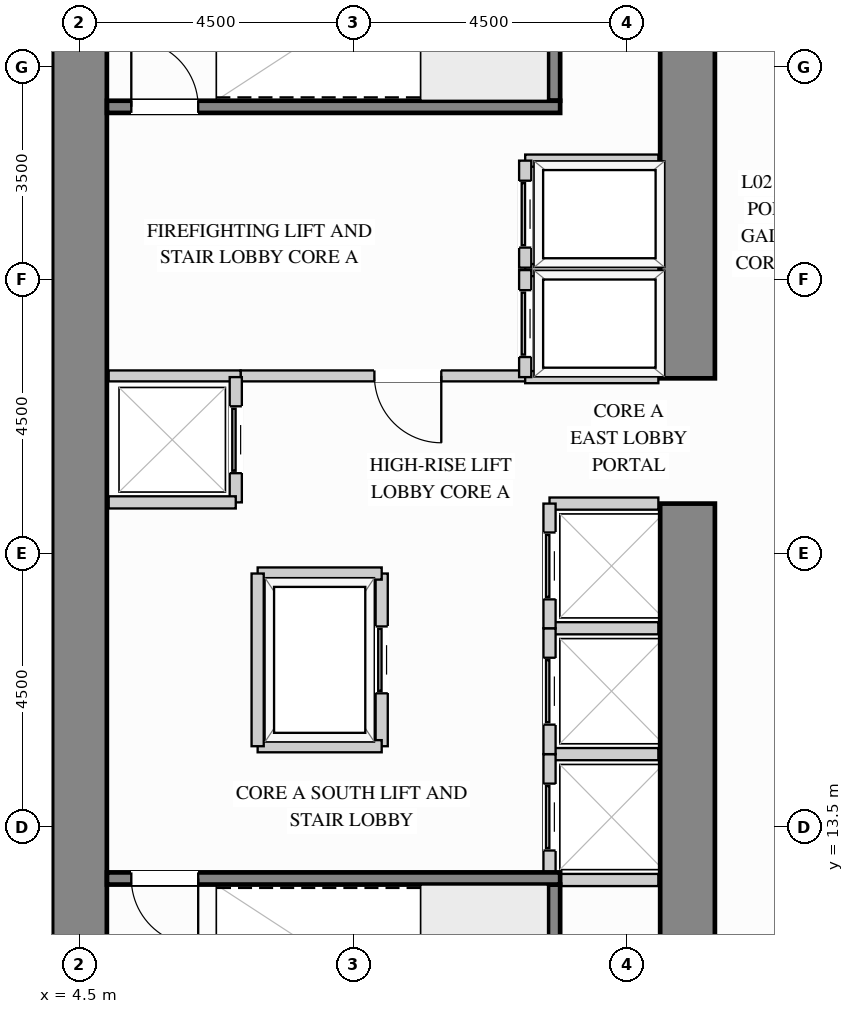
"""IFC4 building model, lengths in metres.
Left out: names, types, materials, properties, quantities, classifications, styles, units other than length and angle.
Written with IfcOpenShell. Run it as: python <this file> out.ifc"""

import sys

from ifc_helpers import new_model, si_unit, direction, frame, frame_2d, origin, place, context, subcontext, project, spatial, rectangle, extrude, source, transform, mapped, element, fill, save


model = new_model("IFC4")
c1 = context("Model", 3, precision=1e-05, world=origin(), true_north=direction((0.0, 1.0)))
c2 = subcontext(c1, "Body", "Model", "MODEL_VIEW")
j1 = project(units=[si_unit("LENGTHUNIT", "METRE"), si_unit("PLANEANGLEUNIT", "RADIAN")], contexts=[c1])
p1 = place(None, origin())
s1 = spatial("IfcSite", under=j1, at=p1, CompositionType="ELEMENT")
p2 = place(p1, origin())
s2 = spatial("IfcBuilding", under=s1, at=p2, CompositionType="ELEMENT")
p3 = place(p2, frame((0.0, 0.0, 9.0)))
s3 = spatial("IfcBuildingStorey", under=s2, at=p3, CompositionType="ELEMENT", Elevation=9.0)
m1 = source(origin(), c2, "Body", "SweptSolid", [
    extrude(rectangle(XDim=9.87, YDim=0.9, at=frame_2d((4.935, 0.0))), origin(), (0.0, 0.0, 1.0), 4.25),
])
p4 = place(p3, frame((14.5, 8.95, 0.0), z_axis=(0.0, 0.0, 1.0), x_axis=(0.0, 1.0, 0.0)))
e1 = element("IfcWall", 1, at=p4, inside=s3, PredefinedType="SHEAR", context=c2, shape_type="MappedRepresentation", body=[
    mapped(m1, transform((0.0, 0.0, 0.0), x_axis=(1.0, 0.0, 0.0), y_axis=(0.0, 1.0, 0.0), z_axis=(0.0, 0.0, 1.0))),
])
m2 = source(origin(), c2, "Body", "SweptSolid", [
    extrude(rectangle(XDim=8.17, YDim=0.9, at=frame_2d((4.085, 0.0))), origin(), (0.0, 0.0, 1.0), 4.25),
])
p5 = place(p3, frame((14.5, 20.88, 0.0), z_axis=(0.0, 0.0, 1.0), x_axis=(0.0, 1.0, 0.0)))
e2 = element("IfcWall", 2, at=p5, inside=s3, PredefinedType="SHEAR", context=c2, shape_type="MappedRepresentation", body=[
    mapped(m2, transform((0.0, 0.0, 0.0), x_axis=(1.0, 0.0, 0.0), y_axis=(0.0, 1.0, 0.0), z_axis=(0.0, 0.0, 1.0))),
])
m3 = source(origin(), c2, "Body", "SweptSolid", [
    extrude(rectangle(XDim=20.1, YDim=0.9, at=frame_2d((10.05, 0.0))), origin(), (0.0, 0.0, 1.0), 4.25),
])
p6 = place(p3, frame((4.5, 8.95, 0.0), z_axis=(0.0, 0.0, 1.0), x_axis=(0.0, 1.0, 0.0)))
e3 = element("IfcWall", 3, at=p6, inside=s3, PredefinedType="SHEAR", context=c2, shape_type="MappedRepresentation", body=[
    mapped(m3, transform((0.0, 0.0, 0.0), x_axis=(1.0, 0.0, 0.0), y_axis=(0.0, 1.0, 0.0), z_axis=(0.0, 0.0, 1.0))),
])
p7 = place(p3, frame((7.15, 20.92, 0.0), z_axis=(0.0, 0.0, 1.0), x_axis=(1.0, 0.0, 0.0)))
e4 = element("IfcWall", 4, at=p7, inside=s3, PredefinedType="PARTITIONING", context=c2, shape_type="SweptSolid", body=[
    extrude(rectangle(XDim=4.68, YDim=0.18, at=frame_2d((2.34, 0.0))), origin(), (0.0, 0.0, 1.0), 4.235),
])
p8 = place(p7, frame((2.2, 0.0, 0.0)))
e5 = element("IfcOpeningElement", 5, at=p8, cuts=e4, PredefinedType="OPENING", context=c2, shape_type="SweptSolid", body=[
    extrude(rectangle(XDim=1.1, YDim=2.15, at=frame_2d((0.55, 1.075))), frame((0.0, 0.1, 0.0), z_axis=(0.0, -1.0, 0.0), x_axis=(1.0, 0.0, 0.0)), (0.0, 0.0, 1.0), 0.2),
])
m4 = source(origin(), c2, "Body", "SweptSolid", [
    extrude(rectangle(XDim=2.17, YDim=0.18, at=frame_2d((1.085, 0.0))), origin(), (0.0, 0.0, 1.0), 4.235),
])
p9 = place(p3, frame((4.98, 20.92, 0.0), z_axis=(0.0, 0.0, 1.0), x_axis=(1.0, 0.0, 0.0)))
e6 = element("IfcWall", 6, at=p9, inside=s3, PredefinedType="PARTITIONING", context=c2, shape_type="MappedRepresentation", body=[
    mapped(m4, transform((0.0, 0.0, 0.0), x_axis=(1.0, 0.0, 0.0), y_axis=(0.0, 1.0, 0.0), z_axis=(0.0, 0.0, 1.0))),
])
m5 = source(origin(), c2, "Body", "SweptSolid", [
    extrude(rectangle(XDim=2.19, YDim=0.2, at=frame_2d((1.095, 0.0))), origin(), (0.0, 0.0, 1.0), 4.235),
])
for number, where, z_axis, x_axis in (
    (7, (11.83, 22.66, 0.0), (0.0, 0.0, 1.0), (1.0, 0.0, 0.0)),
    (8, (11.83, 20.9, 0.0), (0.0, 0.0, 1.0), (1.0, 0.0, 0.0)),
):
    element("IfcWall", number, at=place(p3, frame(where, z_axis=z_axis, x_axis=x_axis)), inside=s3, PredefinedType="PARTITIONING", context=c2, shape_type="MappedRepresentation", body=[
        mapped(m5, transform((0.0, 0.0, 0.0), x_axis=(1.0, 0.0, 0.0), y_axis=(0.0, 1.0, 0.0), z_axis=(0.0, 0.0, 1.0))),
    ])
p10 = place(p3, frame((11.83, 20.9, 0.0), z_axis=(0.0, 0.0, 1.0), x_axis=(0.0, 1.0, 0.0)))
e9 = element("IfcWall", 9, at=p10, inside=s3, PredefinedType="PARTITIONING", context=c2, shape_type="SweptSolid", body=[
    extrude(rectangle(XDim=1.76, YDim=0.2, at=frame_2d((0.88, 0.0))), origin(), (0.0, 0.0, 1.0), 4.235),
])
p11 = place(p10, frame((0.33, 0.0, 0.0)))
e10 = element("IfcOpeningElement", 10, at=p11, cuts=e9, PredefinedType="OPENING", context=c2, shape_type="SweptSolid", body=[
    extrude(rectangle(XDim=1.1, YDim=2.2, at=frame_2d((0.55, 1.1))), frame((0.0, 0.11, 0.0), z_axis=(0.0, -1.0, 0.0), x_axis=(1.0, 0.0, 0.0)), (0.0, 0.0, 1.0), 0.22),
])
p12 = place(p3, frame((11.83, 24.46, 0.0), z_axis=(0.0, 0.0, 1.0), x_axis=(1.0, 0.0, 0.0)))
e11 = element("IfcWall", 11, at=p12, inside=s3, PredefinedType="PARTITIONING", context=c2, shape_type="MappedRepresentation", body=[
    mapped(m5, transform((0.0, 0.0, 0.0), x_axis=(1.0, 0.0, 0.0), y_axis=(0.0, 1.0, 0.0), z_axis=(0.0, 0.0, 1.0))),
])
p13 = place(p3, frame((11.83, 22.7, 0.0), z_axis=(0.0, 0.0, 1.0), x_axis=(0.0, 1.0, 0.0)))
e12 = element("IfcWall", 12, at=p13, inside=s3, PredefinedType="PARTITIONING", context=c2, shape_type="SweptSolid", body=[
    extrude(rectangle(XDim=1.76, YDim=0.2, at=frame_2d((0.88, 0.0))), origin(), (0.0, 0.0, 1.0), 4.235),
])
p14 = place(p13, frame((0.33, 0.0, 0.0)))
e13 = element("IfcOpeningElement", 13, at=p14, cuts=e12, PredefinedType="OPENING", context=c2, shape_type="SweptSolid", body=[
    extrude(rectangle(XDim=1.1, YDim=2.2, at=frame_2d((0.55, 1.1))), frame((0.0, 0.11, 0.0), z_axis=(0.0, -1.0, 0.0), x_axis=(1.0, 0.0, 0.0)), (0.0, 0.0, 1.0), 0.22),
])
m6 = source(origin(), c2, "Body", "SweptSolid", [
    extrude(rectangle(XDim=1.79, YDim=0.2, at=frame_2d((0.895, 0.0))), origin(), (0.0, 0.0, 1.0), 4.235),
])
for number, where, z_axis, x_axis in (
    (14, (12.23, 14.7, 0.0), (0.0, 0.0, 1.0), (1.0, 0.0, 0.0)),
    (15, (12.23, 12.63, 0.0), (0.0, 0.0, 1.0), (1.0, 0.0, 0.0)),
):
    element("IfcWall", number, at=place(p3, frame(where, z_axis=z_axis, x_axis=x_axis)), inside=s3, PredefinedType="PARTITIONING", context=c2, shape_type="MappedRepresentation", body=[
        mapped(m6, transform((0.0, 0.0, 0.0), x_axis=(1.0, 0.0, 0.0), y_axis=(0.0, 1.0, 0.0), z_axis=(0.0, 0.0, 1.0))),
    ])
p15 = place(p3, frame((12.23, 12.63, 0.0), z_axis=(0.0, 0.0, 1.0), x_axis=(0.0, 1.0, 0.0)))
e16 = element("IfcWall", 16, at=p15, inside=s3, PredefinedType="PARTITIONING", context=c2, shape_type="SweptSolid", body=[
    extrude(rectangle(XDim=2.07, YDim=0.2, at=frame_2d((1.035, 0.0))), origin(), (0.0, 0.0, 1.0), 4.235),
])
p16 = place(p15, frame((0.485, 0.0, 0.0)))
e17 = element("IfcOpeningElement", 17, at=p16, cuts=e16, PredefinedType="OPENING", context=c2, shape_type="SweptSolid", body=[
    extrude(rectangle(XDim=1.1, YDim=2.2, at=frame_2d((0.55, 1.1))), frame((0.0, 0.11, 0.0), z_axis=(0.0, -1.0, 0.0), x_axis=(1.0, 0.0, 0.0)), (0.0, 0.0, 1.0), 0.22),
])
p17 = place(p3, frame((12.23, 16.77, 0.0), z_axis=(0.0, 0.0, 1.0), x_axis=(1.0, 0.0, 0.0)))
e18 = element("IfcWall", 18, at=p17, inside=s3, PredefinedType="PARTITIONING", context=c2, shape_type="MappedRepresentation", body=[
    mapped(m6, transform((0.0, 0.0, 0.0), x_axis=(1.0, 0.0, 0.0), y_axis=(0.0, 1.0, 0.0), z_axis=(0.0, 0.0, 1.0))),
])
p18 = place(p3, frame((12.23, 14.7, 0.0), z_axis=(0.0, 0.0, 1.0), x_axis=(0.0, 1.0, 0.0)))
e19 = element("IfcWall", 19, at=p18, inside=s3, PredefinedType="PARTITIONING", context=c2, shape_type="SweptSolid", body=[
    extrude(rectangle(XDim=2.07, YDim=0.2, at=frame_2d((1.035, 0.0))), origin(), (0.0, 0.0, 1.0), 4.235),
])
p19 = place(p18, frame((0.485, 0.0, 0.0)))
e20 = element("IfcOpeningElement", 20, at=p19, cuts=e19, PredefinedType="OPENING", context=c2, shape_type="SweptSolid", body=[
    extrude(rectangle(XDim=1.1, YDim=2.2, at=frame_2d((0.55, 1.1))), frame((0.0, 0.11, 0.0), z_axis=(0.0, -1.0, 0.0), x_axis=(1.0, 0.0, 0.0)), (0.0, 0.0, 1.0), 0.22),
])
p20 = place(p3, frame((12.23, 18.82, 0.0), z_axis=(0.0, 0.0, 1.0), x_axis=(1.0, 0.0, 0.0)))
e21 = element("IfcWall", 21, at=p20, inside=s3, PredefinedType="PARTITIONING", context=c2, shape_type="MappedRepresentation", body=[
    mapped(m6, transform((0.0, 0.0, 0.0), x_axis=(1.0, 0.0, 0.0), y_axis=(0.0, 1.0, 0.0), z_axis=(0.0, 0.0, 1.0))),
])
p21 = place(p3, frame((12.23, 16.77, 0.0), z_axis=(0.0, 0.0, 1.0), x_axis=(0.0, 1.0, 0.0)))
e22 = element("IfcWall", 22, at=p21, inside=s3, PredefinedType="PARTITIONING", context=c2, shape_type="SweptSolid", body=[
    extrude(rectangle(XDim=2.05, YDim=0.2, at=frame_2d((1.025, 0.0))), origin(), (0.0, 0.0, 1.0), 4.235),
])
p22 = place(p21, frame((0.475, 0.0, 0.0)))
e23 = element("IfcOpeningElement", 23, at=p22, cuts=e22, PredefinedType="OPENING", context=c2, shape_type="SweptSolid", body=[
    extrude(rectangle(XDim=1.1, YDim=2.2, at=frame_2d((0.55, 1.1))), frame((0.0, 0.11, 0.0), z_axis=(0.0, -1.0, 0.0), x_axis=(1.0, 0.0, 0.0)), (0.0, 0.0, 1.0), 0.22),
])
p23 = place(p3, frame((7.07, 18.84, 0.0), z_axis=(0.0, 0.0, 1.0), x_axis=(0.0, 1.0, 0.0)))
e24 = element("IfcWall", 24, at=p23, inside=s3, PredefinedType="PARTITIONING", context=c2, shape_type="SweptSolid", body=[
    extrude(rectangle(XDim=2.06, YDim=0.2, at=frame_2d((1.03, 0.0))), origin(), (0.0, 0.0, 1.0), 4.235),
])
p24 = place(p23, frame((0.48, 0.0, 0.0)))
e25 = element("IfcOpeningElement", 25, at=p24, cuts=e24, PredefinedType="OPENING", context=c2, shape_type="SweptSolid", body=[
    extrude(rectangle(XDim=1.1, YDim=2.2, at=frame_2d((0.55, 1.1))), frame((0.0, 0.11, 0.0), z_axis=(0.0, -1.0, 0.0), x_axis=(1.0, 0.0, 0.0)), (0.0, 0.0, 1.0), 0.22),
])
m7 = source(origin(), c2, "Body", "SweptSolid", [
    extrude(rectangle(XDim=2.09, YDim=0.2, at=frame_2d((1.045, 0.0))), origin(), (0.0, 0.0, 1.0), 4.235),
])
p25 = place(p3, frame((4.98, 18.84, 0.0), z_axis=(0.0, 0.0, 1.0), x_axis=(1.0, 0.0, 0.0)))
e26 = element("IfcWall", 26, at=p25, inside=s3, PredefinedType="PARTITIONING", context=c2, shape_type="MappedRepresentation", body=[
    mapped(m7, transform((0.0, 0.0, 0.0), x_axis=(1.0, 0.0, 0.0), y_axis=(0.0, 1.0, 0.0), z_axis=(0.0, 0.0, 1.0))),
])
p26 = place(p3, frame((9.47, 14.83, 0.0), z_axis=(0.0, 0.0, 1.0), x_axis=(0.0, 1.0, 0.0)))
e27 = element("IfcWall", 27, at=p26, inside=s3, PredefinedType="PARTITIONING", context=c2, shape_type="SweptSolid", body=[
    extrude(rectangle(XDim=2.84, YDim=0.2, at=frame_2d((1.42, 0.0))), origin(), (0.0, 0.0, 1.0), 4.235),
])
p27 = place(p26, frame((0.87, 0.0, 0.0)))
e28 = element("IfcOpeningElement", 28, at=p27, cuts=e27, PredefinedType="OPENING", context=c2, shape_type="SweptSolid", body=[
    extrude(rectangle(XDim=1.1, YDim=2.2, at=frame_2d((0.55, 1.1))), frame((0.0, 0.11, 0.0), z_axis=(0.0, -1.0, 0.0), x_axis=(1.0, 0.0, 0.0)), (0.0, 0.0, 1.0), 0.22),
])
m8 = source(origin(), c2, "Body", "SweptSolid", [
    extrude(rectangle(XDim=2.04, YDim=0.2, at=frame_2d((1.02, 0.0))), origin(), (0.0, 0.0, 1.0), 4.235),
])
for number, where, z_axis, x_axis in (
    (29, (7.43, 17.67, 0.0), (0.0, 0.0, 1.0), (1.0, 0.0, 0.0)),
    (30, (7.43, 14.83, 0.0), (0.0, 0.0, 1.0), (1.0, 0.0, 0.0)),
):
    element("IfcWall", number, at=place(p3, frame(where, z_axis=z_axis, x_axis=x_axis)), inside=s3, PredefinedType="PARTITIONING", context=c2, shape_type="MappedRepresentation", body=[
        mapped(m8, transform((0.0, 0.0, 0.0), x_axis=(1.0, 0.0, 0.0), y_axis=(0.0, 1.0, 0.0), z_axis=(0.0, 0.0, 1.0))),
    ])
m9 = source(origin(), c2, "Body", "SweptSolid", [
    extrude(rectangle(XDim=2.84, YDim=0.2, at=frame_2d((1.42, 0.0))), origin(), (0.0, 0.0, 1.0), 4.235),
])
p28 = place(p3, frame((7.43, 14.83, 0.0), z_axis=(0.0, 0.0, 1.0), x_axis=(0.0, 1.0, 0.0)))
e31 = element("IfcWall", 31, at=p28, inside=s3, PredefinedType="PARTITIONING", context=c2, shape_type="MappedRepresentation", body=[
    mapped(m9, transform((0.0, 0.0, 0.0), x_axis=(1.0, 0.0, 0.0), y_axis=(0.0, 1.0, 0.0), z_axis=(0.0, 0.0, 1.0))),
])
m10 = source(origin(), c2, "Body", "SweptSolid", [
    extrude(rectangle(XDim=3.603, YDim=0.2, at=frame_2d((1.802, 0.0))), origin(), (0.0, 0.0, 1.0), 4.25),
])
p29 = place(p3, frame((12.305, 8.952, 0.0), z_axis=(0.0, 0.0, 1.0), x_axis=(0.0, 1.0, 0.0)))
e32 = element("IfcWall", 32, at=p29, inside=s3, PredefinedType="SHEAR", context=c2, shape_type="MappedRepresentation", body=[
    mapped(m10, transform((0.0, 0.0, 0.0), x_axis=(1.0, 0.0, 0.0), y_axis=(0.0, 1.0, 0.0), z_axis=(0.0, 0.0, 1.0))),
])
p30 = place(p3, frame((4.952, 12.655, 0.0), z_axis=(0.0, 0.0, 1.0), x_axis=(1.0, 0.0, 0.0)))
e33 = element("IfcWall", 33, at=p30, inside=s3, PredefinedType="SHEAR", context=c2, shape_type="SweptSolid", body=[
    extrude(rectangle(XDim=7.453, YDim=0.2, at=frame_2d((3.727, 0.0))), origin(), (0.0, 0.0, 1.0), 4.25),
])
p31 = place(p30, frame((0.4, 0.0, 0.0)))
e34 = element("IfcOpeningElement", 34, at=p31, cuts=e33, PredefinedType="OPENING", context=c2, shape_type="SweptSolid", body=[
    extrude(rectangle(XDim=1.1, YDim=2.15, at=frame_2d((0.55, 1.075))), frame((0.0, 0.11, 0.0), z_axis=(0.0, -1.0, 0.0), x_axis=(1.0, 0.0, 0.0)), (0.0, 0.0, 1.0), 0.22),
])
p32 = place(p3, frame((12.305, 25.445, 0.0), z_axis=(0.0, 0.0, 1.0), x_axis=(0.0, 1.0, 0.0)))
e35 = element("IfcWall", 35, at=p32, inside=s3, PredefinedType="SHEAR", context=c2, shape_type="MappedRepresentation", body=[
    mapped(m10, transform((0.0, 0.0, 0.0), x_axis=(1.0, 0.0, 0.0), y_axis=(0.0, 1.0, 0.0), z_axis=(0.0, 0.0, 1.0))),
])
p33 = place(p3, frame((4.952, 25.345, 0.0), z_axis=(0.0, 0.0, 1.0), x_axis=(1.0, 0.0, 0.0)))
e36 = element("IfcWall", 36, at=p33, inside=s3, PredefinedType="SHEAR", context=c2, shape_type="SweptSolid", body=[
    extrude(rectangle(XDim=7.453, YDim=0.2, at=frame_2d((3.727, 0.0))), origin(), (0.0, 0.0, 1.0), 4.25),
])
p34 = place(p33, frame((0.4, 0.0, 0.0)))
e37 = element("IfcOpeningElement", 37, at=p34, cuts=e36, PredefinedType="OPENING", context=c2, shape_type="SweptSolid", body=[
    extrude(rectangle(XDim=1.1, YDim=2.15, at=frame_2d((0.55, 1.075))), frame((0.0, 0.11, 0.0), z_axis=(0.0, -1.0, 0.0), x_axis=(1.0, 0.0, 0.0)), (0.0, 0.0, 1.0), 0.22),
])
m11 = source(origin(), c2, "Body", "SweptSolid", [
    extrude(rectangle(XDim=1.1, YDim=2.15, at=frame_2d((0.55, 1.075))), frame((0.0, 0.025, 0.0), z_axis=(0.0, -1.0, 0.0), x_axis=(1.0, 0.0, 0.0)), (0.0, 0.0, 1.0), 0.05),
])
p35 = place(p8, origin())
e38 = element("IfcDoor", 38, at=p35, inside=s3, OperationType="SINGLE_SWING_RIGHT", PredefinedType="DOOR", context=c2, shape_type="MappedRepresentation", body=[
    mapped(m11, transform((0.0, 0.0, 0.0), x_axis=(1.0, 0.0, 0.0), y_axis=(0.0, 1.0, 0.0), z_axis=(0.0, 0.0, 1.0))),
])
fill(e5, e38)
m12 = source(origin(), c2, "Body", "SweptSolid", [
    extrude(rectangle(XDim=1.1, YDim=2.2, at=frame_2d((0.55, 1.1))), frame((0.0, 0.025, 0.0), z_axis=(0.0, -1.0, 0.0), x_axis=(1.0, 0.0, 0.0)), (0.0, 0.0, 1.0), 0.05),
])
p36 = place(p11, origin())
e39 = element("IfcDoor", 39, at=p36, inside=s3, OperationType="SLIDING_TO_LEFT", PredefinedType="DOOR", context=c2, shape_type="MappedRepresentation", body=[
    mapped(m12, transform((0.0, 0.0, 0.0), x_axis=(1.0, 0.0, 0.0), y_axis=(0.0, 1.0, 0.0), z_axis=(0.0, 0.0, 1.0))),
])
fill(e10, e39)
p37 = place(p14, origin())
e40 = element("IfcDoor", 40, at=p37, inside=s3, OperationType="SLIDING_TO_LEFT", PredefinedType="DOOR", context=c2, shape_type="MappedRepresentation", body=[
    mapped(m12, transform((0.0, 0.0, 0.0), x_axis=(1.0, 0.0, 0.0), y_axis=(0.0, 1.0, 0.0), z_axis=(0.0, 0.0, 1.0))),
])
fill(e13, e40)
p38 = place(p16, origin())
e41 = element("IfcDoor", 41, at=p38, inside=s3, OperationType="SLIDING_TO_LEFT", PredefinedType="DOOR", context=c2, shape_type="MappedRepresentation", body=[
    mapped(m12, transform((0.0, 0.0, 0.0), x_axis=(1.0, 0.0, 0.0), y_axis=(0.0, 1.0, 0.0), z_axis=(0.0, 0.0, 1.0))),
])
fill(e17, e41)
p39 = place(p19, origin())
e42 = element("IfcDoor", 42, at=p39, inside=s3, OperationType="SLIDING_TO_LEFT", PredefinedType="DOOR", context=c2, shape_type="MappedRepresentation", body=[
    mapped(m12, transform((0.0, 0.0, 0.0), x_axis=(1.0, 0.0, 0.0), y_axis=(0.0, 1.0, 0.0), z_axis=(0.0, 0.0, 1.0))),
])
fill(e20, e42)
p40 = place(p22, origin())
e43 = element("IfcDoor", 43, at=p40, inside=s3, OperationType="SLIDING_TO_LEFT", PredefinedType="DOOR", context=c2, shape_type="MappedRepresentation", body=[
    mapped(m12, transform((0.0, 0.0, 0.0), x_axis=(1.0, 0.0, 0.0), y_axis=(0.0, 1.0, 0.0), z_axis=(0.0, 0.0, 1.0))),
])
fill(e23, e43)
p41 = place(p24, origin())
e44 = element("IfcDoor", 44, at=p41, inside=s3, OperationType="SLIDING_TO_LEFT", PredefinedType="DOOR", context=c2, shape_type="MappedRepresentation", body=[
    mapped(m12, transform((0.0, 0.0, 0.0), x_axis=(1.0, 0.0, 0.0), y_axis=(0.0, 1.0, 0.0), z_axis=(0.0, 0.0, 1.0))),
])
fill(e25, e44)
p42 = place(p27, origin())
e45 = element("IfcDoor", 45, at=p42, inside=s3, OperationType="SLIDING_TO_LEFT", PredefinedType="DOOR", context=c2, shape_type="MappedRepresentation", body=[
    mapped(m12, transform((0.0, 0.0, 0.0), x_axis=(1.0, 0.0, 0.0), y_axis=(0.0, 1.0, 0.0), z_axis=(0.0, 0.0, 1.0))),
])
fill(e28, e45)
m13 = source(origin(), c2, "Body", "SweptSolid", [
    extrude(rectangle(XDim=1.1, YDim=2.15, at=frame_2d((0.55, 1.075))), frame((0.0, 0.025, 0.0), z_axis=(0.0, -1.0, 0.0), x_axis=(1.0, 0.0, 0.0)), (0.0, 0.0, 1.0), 0.05),
])
p43 = place(p31, origin())
e46 = element("IfcDoor", 46, at=p43, inside=s3, OperationType="SINGLE_SWING_RIGHT", PredefinedType="DOOR", context=c2, shape_type="MappedRepresentation", body=[
    mapped(m13, transform((0.0, 0.0, 0.0), x_axis=(1.0, 0.0, 0.0), y_axis=(0.0, 1.0, 0.0), z_axis=(0.0, 0.0, 1.0))),
])
fill(e34, e46)
p44 = place(p34, origin())
e47 = element("IfcDoor", 47, at=p44, inside=s3, OperationType="SINGLE_SWING_LEFT", PredefinedType="DOOR", context=c2, shape_type="MappedRepresentation", body=[
    mapped(m13, transform((0.0, 0.0, 0.0), x_axis=(1.0, 0.0, 0.0), y_axis=(0.0, 1.0, 0.0), z_axis=(0.0, 0.0, 1.0))),
])
fill(e37, e47)
save(model, sys.argv[1])
